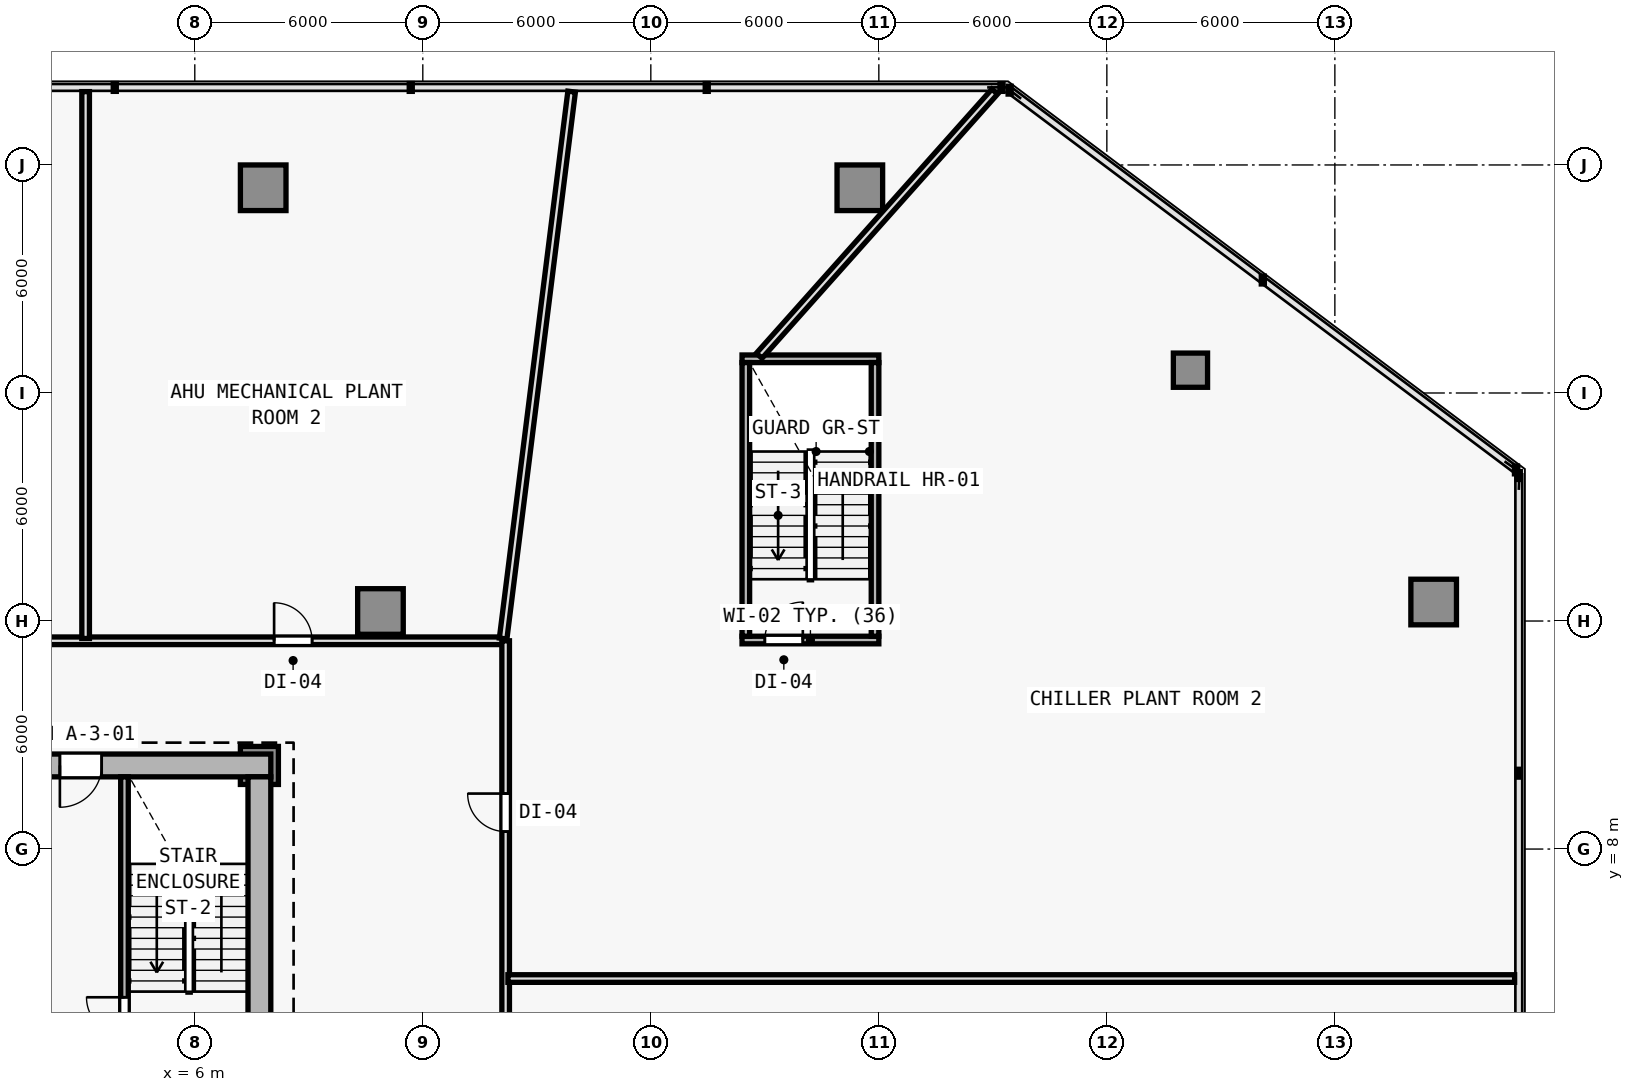
"""IFC4 building model, lengths in metres.
Left out: names, types, materials, properties, quantities, classifications, styles, units other than length and angle.
Written with IfcOpenShell. Run it as: python <this file> out.ifc"""

import sys

from ifc_helpers import new_model, si_unit, direction, frame, frame_2d, origin, origin_2d, place, context, subcontext, project, spatial, rectangle, extrude, element, fill, save


model = new_model("IFC4")
c1 = context("Model", 3, precision=1e-05, world=origin(), true_north=direction((0.0, 1.0)))
c2 = subcontext(c1, "Body", "Model", "MODEL_VIEW")
j1 = project(units=[si_unit("LENGTHUNIT", "METRE"), si_unit("PLANEANGLEUNIT", "RADIAN")], contexts=[c1])
p1 = place(None, origin())
s1 = spatial("IfcSite", under=j1, at=p1, CompositionType="ELEMENT")
p2 = place(p1, origin())
s2 = spatial("IfcBuilding", under=s1, at=p2, CompositionType="ELEMENT")
p3 = place(p2, frame((0.0, 0.0, 21.8)))
s3 = spatial("IfcBuildingStorey", under=s2, at=p3, CompositionType="ELEMENT", Elevation=21.8)
p4 = place(p3, frame((7.7, 10.2, 0.0), z_axis=(0.0, 0.0, 1.0), x_axis=(1.0, 0.0, 0.0)))
e1 = element("IfcColumn", 1, at=p4, inside=s3, PredefinedType="COLUMN", context=c2, shape_type="SweptSolid", body=[
    extrude(rectangle(XDim=1.0, YDim=1.0, at=origin_2d()), origin(), (0.0, 0.0, 1.0), 4.6),
])
for number, where, z_axis, x_axis in (
    (2, (38.6, 14.5, 0.0), (0.0, 0.0, 1.0), (1.0, 0.0, 0.0)),
    (3, (23.5, 25.4, 0.0), (0.0, 0.0, 1.0), (1.0, 0.0, 0.0)),
    (4, (7.8, 25.4, 0.0), (0.0, 0.0, 1.0), (1.0, 0.0, 0.0)),
    (5, (10.885, 14.25, 0.0), (0.0, 0.0, 1.0), (1.0, 0.0, 0.0)),
):
    element("IfcColumn", number, at=place(p3, frame(where, z_axis=z_axis, x_axis=x_axis)), inside=s3, PredefinedType="COLUMN", context=c2, shape_type="SweptSolid", body=[
        extrude(rectangle(XDim=1.2, YDim=1.2, at=origin_2d()), origin(), (0.0, 0.0, 1.0), 4.6),
    ])
p5 = place(p3, frame((32.2, 20.6, 0.0), z_axis=(0.0, 0.0, 1.0), x_axis=(1.0, 0.0, 0.0)))
e6 = element("IfcColumn", 6, at=p5, inside=s3, PredefinedType="COLUMN", context=c2, shape_type="SweptSolid", body=[
    extrude(rectangle(XDim=0.9, YDim=0.9, at=origin_2d()), origin(), (0.0, 0.0, 1.0), 4.6),
])
p6 = place(p3, frame((8.0, 10.2, 0.0), z_axis=(0.0, 0.0, 1.0), x_axis=(-1.0, 0.0, 0.0)))
e7 = element("IfcWall", 7, at=p6, inside=s3, PredefinedType="SHEAR", context=c2, shape_type="SweptSolid", body=[
    extrude(rectangle(XDim=16.0, YDim=0.6, at=frame_2d((8.0, 0.0))), origin(), (0.0, 0.0, 1.0), 4.35),
])
p7 = place(p6, frame((4.45, 0.0, 0.0)))
e8 = element("IfcOpeningElement", 8, at=p7, cuts=e7, PredefinedType="OPENING", context=c2, shape_type="SweptSolid", body=[
    extrude(rectangle(XDim=1.1, YDim=2.15, at=frame_2d((0.55, 1.075))), frame((0.0, 0.31, 0.0), z_axis=(0.0, -1.0, 0.0), x_axis=(1.0, 0.0, 0.0)), (0.0, 0.0, 1.0), 0.62),
])
p8 = place(p3, frame((7.7, 9.9, 0.0), z_axis=(0.0, 0.0, 1.0), x_axis=(0.0, -1.0, 0.0)))
e9 = element("IfcWall", 9, at=p8, inside=s3, PredefinedType="SHEAR", context=c2, shape_type="SweptSolid", body=[
    extrude(rectangle(XDim=19.0, YDim=0.6, at=frame_2d((9.5, 0.0))), origin(), (0.0, 0.0, 1.0), 4.35),
])
p9 = place(p3, frame((4.15, 2.75, 0.0), z_axis=(0.0, 0.0, 1.0), x_axis=(0.0, 1.0, 0.0)))
e10 = element("IfcWall", 10, at=p9, inside=s3, PredefinedType="SOLIDWALL", context=c2, shape_type="SweptSolid", body=[
    extrude(rectangle(XDim=7.15, YDim=0.2, at=frame_2d((3.575, 0.0))), origin(), (0.0, 0.0, 1.0), 4.35),
])
p10 = place(p9, frame((0.35, 0.0, 0.0)))
e11 = element("IfcOpeningElement", 11, at=p10, cuts=e10, PredefinedType="OPENING", context=c2, shape_type="SweptSolid", body=[
    extrude(rectangle(XDim=1.0, YDim=2.15, at=frame_2d((0.5, 1.075))), frame((0.0, 0.11, 0.0), z_axis=(0.0, -1.0, 0.0), x_axis=(1.0, 0.0, 0.0)), (0.0, 0.0, 1.0), 0.22),
])
p11 = place(p3, frame((20.4, 13.5, 0.0), z_axis=(0.0, 0.0, 1.0), x_axis=(1.0, 0.0, 0.0)))
e12 = element("IfcWall", 12, at=p11, inside=s3, PredefinedType="SOLIDWALL", context=c2, shape_type="SweptSolid", body=[
    extrude(rectangle(XDim=3.6, YDim=0.2, at=frame_2d((1.8, 0.0))), origin(), (0.0, 0.0, 1.0), 4.35),
])
p12 = place(p11, frame((0.6, 0.0, 0.0)))
e13 = element("IfcOpeningElement", 13, at=p12, cuts=e12, PredefinedType="OPENING", context=c2, shape_type="SweptSolid", body=[
    extrude(rectangle(XDim=1.0, YDim=2.15, at=frame_2d((0.5, 1.075))), frame((0.0, 0.11, 0.0), z_axis=(0.0, -1.0, 0.0), x_axis=(1.0, 0.0, 0.0)), (0.0, 0.0, 1.0), 0.22),
])
p13 = place(p3, frame((20.4, 20.9, 0.0), z_axis=(0.0, 0.0, 1.0), x_axis=(1.0, 0.0, 0.0)))
e14 = element("IfcWall", 14, at=p13, inside=s3, PredefinedType="SOLIDWALL", context=c2, shape_type="SweptSolid", body=[
    extrude(rectangle(XDim=3.6, YDim=0.2, at=frame_2d((1.8, 0.0))), origin(), (0.0, 0.0, 1.0), 4.35),
])
for number, where, z_axis, x_axis in (
    (15, (20.5, 13.6, 0.0), (0.0, 0.0, 1.0), (0.0, 1.0, 0.0)),
    (16, (23.9, 13.6, 0.0), (0.0, 0.0, 1.0), (0.0, 1.0, 0.0)),
):
    element("IfcWall", number, at=place(p3, frame(where, z_axis=z_axis, x_axis=x_axis)), inside=s3, PredefinedType="SOLIDWALL", context=c2, shape_type="SweptSolid", body=[
        extrude(rectangle(XDim=7.2, YDim=0.2, at=frame_2d((3.6, 0.0))), origin(), (0.0, 0.0, 1.0), 4.35),
    ])
p14 = place(p3, frame((-11.1, 13.48, 0.0), z_axis=(0.0, 0.0, 1.0), x_axis=(1.0, 0.0, 0.0)))
e17 = element("IfcWall", 17, at=p14, inside=s3, PredefinedType="SOLIDWALL", context=c2, shape_type="SweptSolid", body=[
    extrude(rectangle(XDim=25.3, YDim=0.2, at=frame_2d((12.65, 0.0))), origin(), (0.0, 0.0, 1.0), 3.025),
])
p15 = place(p14, frame((19.187, 0.0, 0.0)))
e18 = element("IfcOpeningElement", 18, at=p15, cuts=e17, PredefinedType="OPENING", context=c2, shape_type="SweptSolid", body=[
    extrude(rectangle(XDim=1.0, YDim=2.15, at=frame_2d((0.5, 1.075))), frame((0.0, 0.11, 0.0), z_axis=(0.0, -1.0, 0.0), x_axis=(1.0, 0.0, 0.0)), (0.0, 0.0, 1.0), 0.22),
])
p16 = place(p14, frame((6.69, 0.0, 0.0)))
e19 = element("IfcOpeningElement", 19, at=p16, cuts=e17, PredefinedType="OPENING", context=c2, shape_type="SweptSolid", body=[
    extrude(rectangle(XDim=1.0, YDim=2.15, at=frame_2d((0.5, 1.075))), frame((0.0, 0.11, 0.0), z_axis=(0.0, -1.0, 0.0), x_axis=(1.0, 0.0, 0.0)), (0.0, 0.0, 1.0), 0.22),
])
p17 = place(p3, frame((14.18, -12.68, 0.0), z_axis=(0.0, 0.0, 1.0), x_axis=(0.0, 1.0, 0.0)))
e20 = element("IfcWall", 20, at=p17, inside=s3, PredefinedType="SOLIDWALL", context=c2, shape_type="SweptSolid", body=[
    extrude(rectangle(XDim=26.16, YDim=0.2, at=frame_2d((13.08, 0.0))), origin(), (0.0, 0.0, 1.0), 3.025),
])
p18 = place(p17, frame((0.94, 0.0, 0.0)))
e21 = element("IfcOpeningElement", 21, at=p18, cuts=e20, PredefinedType="OPENING", context=c2, shape_type="SweptSolid", body=[
    extrude(rectangle(XDim=1.0, YDim=2.15, at=frame_2d((0.5, 1.075))), frame((0.0, 0.11, 0.0), z_axis=(0.0, -1.0, 0.0), x_axis=(1.0, 0.0, 0.0)), (0.0, 0.0, 1.0), 0.22),
])
p19 = place(p17, frame((9.5, 0.0, 0.0)))
e22 = element("IfcOpeningElement", 22, at=p19, cuts=e20, PredefinedType="OPENING", context=c2, shape_type="SweptSolid", body=[
    extrude(rectangle(XDim=1.0, YDim=2.15, at=frame_2d((0.5, 1.075))), frame((0.0, 0.11, 0.0), z_axis=(0.0, -1.0, 0.0), x_axis=(1.0, 0.0, 0.0)), (0.0, 0.0, 1.0), 0.22),
])
p20 = place(p17, frame((21.14, 0.0, 0.0)))
e23 = element("IfcOpeningElement", 23, at=p20, cuts=e20, PredefinedType="OPENING", context=c2, shape_type="SweptSolid", body=[
    extrude(rectangle(XDim=1.0, YDim=2.15, at=frame_2d((0.5, 1.075))), frame((0.0, 0.11, 0.0), z_axis=(0.0, -1.0, 0.0), x_axis=(1.0, 0.0, 0.0)), (0.0, 0.0, 1.0), 0.22),
])
p21 = place(p3, frame((14.24, 4.593, 0.0), z_axis=(0.0, 0.0, 1.0), x_axis=(1.0, 0.0, 0.0)))
e24 = element("IfcWall", 24, at=p21, inside=s3, PredefinedType="SOLIDWALL", context=c2, shape_type="SweptSolid", body=[
    extrude(rectangle(XDim=26.49, YDim=0.2, at=frame_2d((13.245, 0.0))), origin(), (0.0, 0.0, 1.0), 3.025),
])
p22 = place(p3, frame((20.851, 20.98, 0.0), z_axis=(0.0, 0.0, 1.0), x_axis=(0.665565515712, 0.74633942968, 0.0)))
e25 = element("IfcWall", 25, at=p22, inside=s3, PredefinedType="SOLIDWALL", context=c2, shape_type="SweptSolid", body=[
    extrude(rectangle(XDim=9.312, YDim=0.2, at=frame_2d((4.656, 0.0))), origin(), (0.0, 0.0, 1.0), 3.735),
])
p23 = place(p3, frame((14.114, 13.539, 0.0), z_axis=(0.0, 0.0, 1.0), x_axis=(0.12428127589, 0.992247027944, 0.0)))
e26 = element("IfcWall", 26, at=p23, inside=s3, PredefinedType="SOLIDWALL", context=c2, shape_type="SweptSolid", body=[
    extrude(rectangle(XDim=14.503, YDim=0.2, at=frame_2d((7.252, 0.0))), origin(), (0.0, 0.0, 1.0), 3.317),
])
p24 = place(p3, frame((3.127, 13.54, 0.0), z_axis=(0.0, 0.0, 1.0), x_axis=(0.0, 1.0, 0.0)))
e27 = element("IfcWall", 27, at=p24, inside=s3, PredefinedType="SOLIDWALL", context=c2, shape_type="SweptSolid", body=[
    extrude(rectangle(XDim=14.39, YDim=0.2, at=frame_2d((7.195, 0.0))), origin(), (0.0, 0.0, 1.0), 2.925),
])
p25 = place(p7, origin())
e28 = element("IfcDoor", 28, at=p25, inside=s3, OperationType="SINGLE_SWING_RIGHT", PredefinedType="DOOR", context=c2, shape_type="SweptSolid", body=[
    extrude(rectangle(XDim=1.1, YDim=2.15, at=frame_2d((0.55, 1.075))), frame((0.0, 0.025, 0.0), z_axis=(0.0, -1.0, 0.0), x_axis=(1.0, 0.0, 0.0)), (0.0, 0.0, 1.0), 0.05),
])
fill(e8, e28)
p26 = place(p10, origin())
e29 = element("IfcDoor", 29, at=p26, inside=s3, OperationType="SINGLE_SWING_RIGHT", PredefinedType="DOOR", context=c2, shape_type="SweptSolid", body=[
    extrude(rectangle(XDim=1.0, YDim=2.15, at=frame_2d((0.5, 1.075))), frame((0.0, 0.025, 0.0), z_axis=(0.0, -1.0, 0.0), x_axis=(1.0, 0.0, 0.0)), (0.0, 0.0, 1.0), 0.05),
])
fill(e11, e29)
p27 = place(p12, origin())
e30 = element("IfcDoor", 30, at=p27, inside=s3, OperationType="SINGLE_SWING_RIGHT", PredefinedType="DOOR", context=c2, shape_type="SweptSolid", body=[
    extrude(rectangle(XDim=1.0, YDim=2.15, at=frame_2d((0.5, 1.075))), frame((0.0, 0.025, 0.0), z_axis=(0.0, -1.0, 0.0), x_axis=(1.0, 0.0, 0.0)), (0.0, 0.0, 1.0), 0.05),
])
fill(e13, e30)
p28 = place(p20, origin())
e31 = element("IfcDoor", 31, at=p28, inside=s3, OperationType="SINGLE_SWING_RIGHT", PredefinedType="DOOR", context=c2, shape_type="SweptSolid", body=[
    extrude(rectangle(XDim=1.0, YDim=2.15, at=frame_2d((0.5, 1.075))), frame((0.0, 0.025, 0.0), z_axis=(0.0, -1.0, 0.0), x_axis=(1.0, 0.0, 0.0)), (0.0, 0.0, 1.0), 0.05),
])
fill(e23, e31)
p29 = place(p15, origin())
e32 = element("IfcDoor", 32, at=p29, inside=s3, OperationType="SINGLE_SWING_LEFT", PredefinedType="DOOR", context=c2, shape_type="SweptSolid", body=[
    extrude(rectangle(XDim=1.0, YDim=2.15, at=frame_2d((0.5, 1.075))), frame((0.0, 0.025, 0.0), z_axis=(0.0, -1.0, 0.0), x_axis=(1.0, 0.0, 0.0)), (0.0, 0.0, 1.0), 0.05),
])
fill(e18, e32)
save(model, sys.argv[1])
